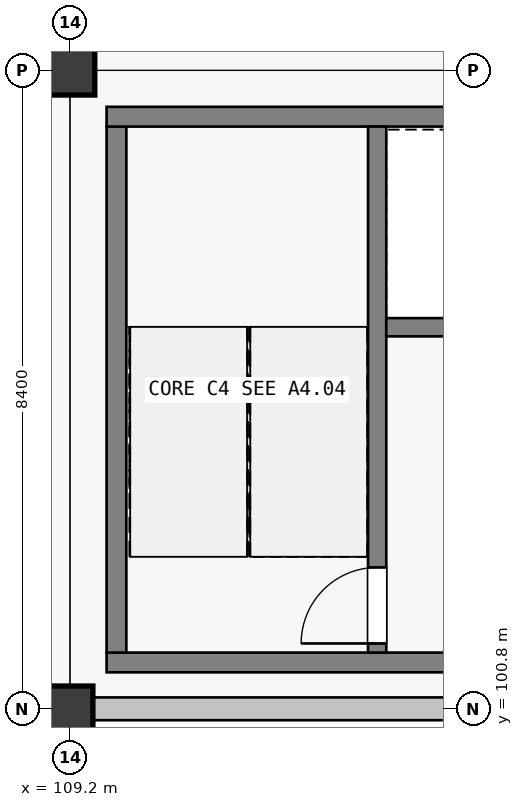
"""IFC4 building model, lengths in metres.
Left out: names, types, materials, properties, quantities, classifications, styles, units other than length and angle.
Written with IfcOpenShell. Run it as: python <this file> out.ifc"""

import sys

from ifc_helpers import new_model, si_unit, direction, frame, frame_2d, origin, origin_2d, place, context, subcontext, project, spatial, rectangle, extrude, element, fill, save


model = new_model("IFC4")
c1 = context("Model", 3, precision=1e-05, world=origin(), true_north=direction((0.0, 1.0)))
c2 = subcontext(c1, "Body", "Model", "MODEL_VIEW")
j1 = project(units=[si_unit("LENGTHUNIT", "METRE"), si_unit("PLANEANGLEUNIT", "RADIAN")], contexts=[c1])
p1 = place(None, origin())
s1 = spatial("IfcSite", under=j1, at=p1, CompositionType="ELEMENT")
p2 = place(p1, origin())
s2 = spatial("IfcBuilding", under=s1, at=p2, CompositionType="ELEMENT")
p3 = place(p2, frame((0.0, 0.0, 23.4)))
s3 = spatial("IfcBuildingStorey", under=s2, at=p3, CompositionType="ELEMENT", Elevation=23.4)
p4 = place(p3, frame((109.2, 100.8, 0.0), z_axis=(0.0, 0.0, 1.0), x_axis=(1.0, 0.0, 0.0)))
e1 = element("IfcColumn", 1, at=p4, inside=s3, PredefinedType="COLUMN", context=c2, shape_type="SweptSolid", body=[
    extrude(rectangle(XDim=0.6, YDim=0.6, at=origin_2d()), origin(), (0.0, 0.0, 1.0), 4.32),
])
p5 = place(p3, frame((109.2, 109.2, 0.0), z_axis=(0.0, 0.0, 1.0), x_axis=(1.0, 0.0, 0.0)))
e2 = element("IfcColumn", 2, at=p5, inside=s3, PredefinedType="COLUMN", context=c2, shape_type="SweptSolid", body=[
    extrude(rectangle(XDim=0.65, YDim=0.65, at=origin_2d()), origin(), (0.0, 0.0, 1.0), 4.32),
])
p6 = place(p3, frame((117.274, 100.8, 0.0), z_axis=(0.0, 0.0, 1.0), x_axis=(-1.0, 0.0, 0.0)))
e3 = element("IfcWall", 3, at=p6, inside=s3, PredefinedType="SOLIDWALL", context=c2, shape_type="SweptSolid", body=[
    extrude(rectangle(XDim=7.773, YDim=0.3, at=frame_2d((3.886, 0.0))), origin(), (0.0, 0.0, 1.0), 3.37),
])
p7 = place(p3, frame((117.12, 101.41, 0.0), z_axis=(0.0, 0.0, 1.0), x_axis=(-1.0, 0.0, 0.0)))
e4 = element("IfcWall", 4, at=p7, inside=s3, PredefinedType="SHEAR", context=c2, shape_type="SweptSolid", body=[
    extrude(rectangle(XDim=7.44, YDim=0.26, at=frame_2d((3.72, 0.0))), origin(), (0.0, 0.0, 1.0), 4.32),
])
p8 = place(p3, frame((109.81, 101.54, 0.0), z_axis=(0.0, 0.0, 1.0), x_axis=(0.0, 1.0, 0.0)))
e5 = element("IfcWall", 5, at=p8, inside=s3, PredefinedType="SHEAR", context=c2, shape_type="SweptSolid", body=[
    extrude(rectangle(XDim=6.92, YDim=0.26, at=frame_2d((3.46, 0.0))), origin(), (0.0, 0.0, 1.0), 4.32),
])
p9 = place(p3, frame((109.68, 108.59, 0.0), z_axis=(0.0, 0.0, 1.0), x_axis=(1.0, 0.0, 0.0)))
e6 = element("IfcWall", 6, at=p9, inside=s3, PredefinedType="SHEAR", context=c2, shape_type="SweptSolid", body=[
    extrude(rectangle(XDim=7.44, YDim=0.26, at=frame_2d((3.72, 0.0))), origin(), (0.0, 0.0, 1.0), 4.32),
])
p10 = place(p3, frame((113.24, 101.54, 0.0), z_axis=(0.0, 0.0, 1.0), x_axis=(0.0, 1.0, 0.0)))
e7 = element("IfcWall", 7, at=p10, inside=s3, PredefinedType="SHEAR", context=c2, shape_type="SweptSolid", body=[
    extrude(rectangle(XDim=6.92, YDim=0.24, at=frame_2d((3.46, 0.0))), origin(), (0.0, 0.0, 1.0), 4.32),
])
p11 = place(p10, frame((0.12, 0.0, 0.0)))
e8 = element("IfcOpeningElement", 8, at=p11, cuts=e7, PredefinedType="OPENING", context=c2, shape_type="SweptSolid", body=[
    extrude(rectangle(XDim=1.0, YDim=2.15, at=frame_2d((0.5, 1.075))), frame((0.0, 0.12, 0.0), z_axis=(0.0, -1.0, 0.0), x_axis=(1.0, 0.0, 0.0)), (0.0, 0.0, 1.0), 0.24),
])
p12 = place(p3, frame((113.36, 105.82, 0.0), z_axis=(0.0, 0.0, 1.0), x_axis=(1.0, 0.0, 0.0)))
e9 = element("IfcWall", 9, at=p12, inside=s3, PredefinedType="SHEAR", context=c2, shape_type="SweptSolid", body=[
    extrude(rectangle(XDim=3.5, YDim=0.24, at=frame_2d((1.75, 0.0))), origin(), (0.0, 0.0, 1.0), 4.32),
])
p13 = place(p12, frame((1.15, 0.0, 0.0)))
e10 = element("IfcOpeningElement", 10, at=p13, cuts=e9, PredefinedType="OPENING", context=c2, shape_type="SweptSolid", body=[
    extrude(rectangle(XDim=1.2, YDim=2.2, at=frame_2d((0.6, 1.1))), frame((0.0, 0.12, 0.0), z_axis=(0.0, -1.0, 0.0), x_axis=(1.0, 0.0, 0.0)), (0.0, 0.0, 1.0), 0.24),
])
p14 = place(p11, origin())
e11 = element("IfcDoor", 11, at=p14, inside=s3, OperationType="SINGLE_SWING_LEFT", PredefinedType="DOOR", context=c2, shape_type="SweptSolid", body=[
    extrude(rectangle(XDim=1.0, YDim=2.15, at=frame_2d((0.5, 1.075))), frame((0.0, 0.025, 0.0), z_axis=(0.0, -1.0, 0.0), x_axis=(1.0, 0.0, 0.0)), (0.0, 0.0, 1.0), 0.05),
])
fill(e8, e11)
save(model, sys.argv[1])
